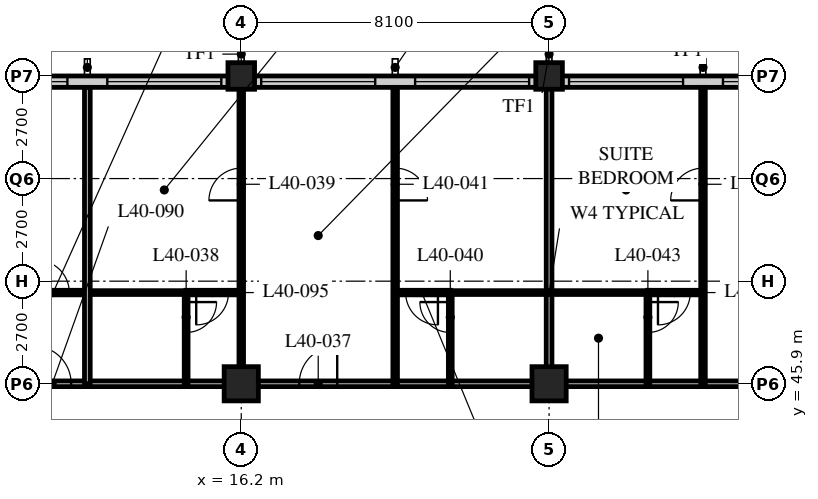
"""IFC4 building model, lengths in metres.
Left out: names, types, materials, properties, quantities, classifications, styles, units other than length and angle.
Written with IfcOpenShell. Run it as: python <this file> out.ifc"""

import sys

from ifc_helpers import new_model, si_unit, direction, frame, frame_2d, origin, origin_2d, place, context, subcontext, project, spatial, rectangle, hollow_rectangle, extrude, element, fill, save


model = new_model("IFC4")
c1 = context("Model", 3, precision=1e-05, world=origin(), true_north=direction((0.0, 1.0)))
c2 = subcontext(c1, "Body", "Model", "MODEL_VIEW")
j1 = project(units=[si_unit("LENGTHUNIT", "METRE"), si_unit("PLANEANGLEUNIT", "RADIAN")], contexts=[c1])
p1 = place(None, origin())
s1 = spatial("IfcSite", under=j1, at=p1, CompositionType="ELEMENT")
p2 = place(p1, origin())
s2 = spatial("IfcBuilding", under=s1, at=p2, CompositionType="ELEMENT")
p3 = place(p2, frame((0.0, 0.0, 154.4)))
s3 = spatial("IfcBuildingStorey", under=s2, at=p3, CompositionType="ELEMENT", Elevation=154.4)
p4 = place(p3, frame((16.2, 45.9, 0.0), z_axis=(0.0, 0.0, 1.0), x_axis=(1.0, 0.0, 0.0)))
e1 = element("IfcColumn", 1, at=p4, inside=s3, PredefinedType="COLUMN", context=c2, shape_type="SweptSolid", body=[
    extrude(hollow_rectangle(XDim=0.9, YDim=0.9, WallThickness=0.1, at=origin_2d()), origin(), (0.0, 0.0, 1.0), 3.4),
])
p5 = place(p3, frame((16.2, 54.0, 0.0), z_axis=(0.0, 0.0, 1.0), x_axis=(1.0, 0.0, 0.0)))
e2 = element("IfcColumn", 2, at=p5, inside=s3, PredefinedType="COLUMN", context=c2, shape_type="SweptSolid", body=[
    extrude(hollow_rectangle(XDim=0.7, YDim=0.7, WallThickness=0.07, at=origin_2d()), origin(), (0.0, 0.0, 1.0), 3.4),
])
p6 = place(p3, frame((24.3, 45.9, 0.0), z_axis=(0.0, 0.0, 1.0), x_axis=(1.0, 0.0, 0.0)))
e3 = element("IfcColumn", 3, at=p6, inside=s3, PredefinedType="COLUMN", context=c2, shape_type="SweptSolid", body=[
    extrude(hollow_rectangle(XDim=0.9, YDim=0.9, WallThickness=0.1, at=origin_2d()), origin(), (0.0, 0.0, 1.0), 3.4),
])
p7 = place(p3, frame((24.3, 54.0, 0.0), z_axis=(0.0, 0.0, 1.0), x_axis=(1.0, 0.0, 0.0)))
e4 = element("IfcColumn", 4, at=p7, inside=s3, PredefinedType="COLUMN", context=c2, shape_type="SweptSolid", body=[
    extrude(hollow_rectangle(XDim=0.7, YDim=0.7, WallThickness=0.07, at=origin_2d()), origin(), (0.0, 0.0, 1.0), 3.4),
])
p8 = place(p3, frame((48.3, 53.85, 0.0), z_axis=(0.0, 0.0, 1.0), x_axis=(-1.0, 0.0, 0.0)))
e5 = element("IfcWall", 5, at=p8, inside=s3, PredefinedType="SOLIDWALL", context=c2, shape_type="SweptSolid", body=[
    extrude(rectangle(XDim=40.2, YDim=0.3, at=frame_2d((20.1, 0.0))), origin(), (0.0, 0.0, 1.0), 2.15),
])
p9 = place(p8, frame((0.225, 0.0, 0.9)))
e6 = element("IfcOpeningElement", 6, at=p9, cuts=e5, PredefinedType="OPENING", context=c2, shape_type="SweptSolid", body=[
    extrude(rectangle(XDim=3.0, YDim=1.2, at=frame_2d((1.5, 0.6))), frame((0.0, 0.16, 0.0), z_axis=(0.0, -1.0, 0.0), x_axis=(1.0, 0.0, 0.0)), (0.0, 0.0, 1.0), 0.32),
])
p10 = place(p8, frame((4.275, 0.0, 0.9)))
e7 = element("IfcOpeningElement", 7, at=p10, cuts=e5, PredefinedType="OPENING", context=c2, shape_type="SweptSolid", body=[
    extrude(rectangle(XDim=3.0, YDim=1.2, at=frame_2d((1.5, 0.6))), frame((0.0, 0.16, 0.0), z_axis=(0.0, -1.0, 0.0), x_axis=(1.0, 0.0, 0.0)), (0.0, 0.0, 1.0), 0.32),
])
p11 = place(p8, frame((8.325, 0.0, 0.9)))
e8 = element("IfcOpeningElement", 8, at=p11, cuts=e5, PredefinedType="OPENING", context=c2, shape_type="SweptSolid", body=[
    extrude(rectangle(XDim=3.0, YDim=1.2, at=frame_2d((1.5, 0.6))), frame((0.0, 0.16, 0.0), z_axis=(0.0, -1.0, 0.0), x_axis=(1.0, 0.0, 0.0)), (0.0, 0.0, 1.0), 0.32),
])
p12 = place(p8, frame((12.375, 0.0, 0.9)))
e9 = element("IfcOpeningElement", 9, at=p12, cuts=e5, PredefinedType="OPENING", context=c2, shape_type="SweptSolid", body=[
    extrude(rectangle(XDim=3.0, YDim=1.2, at=frame_2d((1.5, 0.6))), frame((0.0, 0.16, 0.0), z_axis=(0.0, -1.0, 0.0), x_axis=(1.0, 0.0, 0.0)), (0.0, 0.0, 1.0), 0.32),
])
p13 = place(p8, frame((16.425, 0.0, 0.9)))
e10 = element("IfcOpeningElement", 10, at=p13, cuts=e5, PredefinedType="OPENING", context=c2, shape_type="SweptSolid", body=[
    extrude(rectangle(XDim=3.0, YDim=1.2, at=frame_2d((1.5, 0.6))), frame((0.0, 0.16, 0.0), z_axis=(0.0, -1.0, 0.0), x_axis=(1.0, 0.0, 0.0)), (0.0, 0.0, 1.0), 0.32),
])
p14 = place(p8, frame((20.475, 0.0, 0.9)))
e11 = element("IfcOpeningElement", 11, at=p14, cuts=e5, PredefinedType="OPENING", context=c2, shape_type="SweptSolid", body=[
    extrude(rectangle(XDim=3.0, YDim=1.2, at=frame_2d((1.5, 0.6))), frame((0.0, 0.16, 0.0), z_axis=(0.0, -1.0, 0.0), x_axis=(1.0, 0.0, 0.0)), (0.0, 0.0, 1.0), 0.32),
])
p15 = place(p8, frame((24.525, 0.0, 0.9)))
e12 = element("IfcOpeningElement", 12, at=p15, cuts=e5, PredefinedType="OPENING", context=c2, shape_type="SweptSolid", body=[
    extrude(rectangle(XDim=3.0, YDim=1.2, at=frame_2d((1.5, 0.6))), frame((0.0, 0.16, 0.0), z_axis=(0.0, -1.0, 0.0), x_axis=(1.0, 0.0, 0.0)), (0.0, 0.0, 1.0), 0.32),
])
p16 = place(p8, frame((28.575, 0.0, 0.9)))
e13 = element("IfcOpeningElement", 13, at=p16, cuts=e5, PredefinedType="OPENING", context=c2, shape_type="SweptSolid", body=[
    extrude(rectangle(XDim=3.0, YDim=1.2, at=frame_2d((1.5, 0.6))), frame((0.0, 0.16, 0.0), z_axis=(0.0, -1.0, 0.0), x_axis=(1.0, 0.0, 0.0)), (0.0, 0.0, 1.0), 0.32),
])
p17 = place(p8, frame((32.625, 0.0, 0.9)))
e14 = element("IfcOpeningElement", 14, at=p17, cuts=e5, PredefinedType="OPENING", context=c2, shape_type="SweptSolid", body=[
    extrude(rectangle(XDim=3.0, YDim=1.2, at=frame_2d((1.5, 0.6))), frame((0.0, 0.16, 0.0), z_axis=(0.0, -1.0, 0.0), x_axis=(1.0, 0.0, 0.0)), (0.0, 0.0, 1.0), 0.32),
])
p18 = place(p8, frame((36.675, 0.0, 0.9)))
e15 = element("IfcOpeningElement", 15, at=p18, cuts=e5, PredefinedType="OPENING", context=c2, shape_type="SweptSolid", body=[
    extrude(rectangle(XDim=3.0, YDim=1.2, at=frame_2d((1.5, 0.6))), frame((0.0, 0.16, 0.0), z_axis=(0.0, -1.0, 0.0), x_axis=(1.0, 0.0, 0.0)), (0.0, 0.0, 1.0), 0.32),
])
p19 = place(p3, frame((8.1, 45.9, 0.0), z_axis=(0.0, 0.0, 1.0), x_axis=(1.0, 0.0, 0.0)))
e16 = element("IfcWall", 16, at=p19, inside=s3, PredefinedType="PARTITIONING", context=c2, shape_type="SweptSolid", body=[
    extrude(rectangle(XDim=40.5, YDim=0.15, at=frame_2d((20.25, 0.0))), origin(), (0.0, 0.0, 1.0), 2.15),
])
p20 = place(p19, frame((9.625, 0.0, 0.0)))
e17 = element("IfcOpeningElement", 17, at=p20, cuts=e16, PredefinedType="OPENING", context=c2, shape_type="SweptSolid", body=[
    extrude(rectangle(XDim=1.0, YDim=2.1, at=frame_2d((0.5, 1.05))), frame((0.0, 0.085, 0.0), z_axis=(0.0, -1.0, 0.0), x_axis=(1.0, 0.0, 0.0)), (0.0, 0.0, 1.0), 0.17),
])
p21 = place(p19, frame((21.775, 0.0, 0.0)))
e18 = element("IfcOpeningElement", 18, at=p21, cuts=e16, PredefinedType="OPENING", context=c2, shape_type="SweptSolid", body=[
    extrude(rectangle(XDim=1.0, YDim=2.1, at=frame_2d((0.5, 1.05))), frame((0.0, 0.085, 0.0), z_axis=(0.0, -1.0, 0.0), x_axis=(1.0, 0.0, 0.0)), (0.0, 0.0, 1.0), 0.17),
])
p22 = place(p19, frame((28.95, 0.0, 0.0)))
e19 = element("IfcOpeningElement", 19, at=p22, cuts=e16, PredefinedType="OPENING", context=c2, shape_type="SweptSolid", body=[
    extrude(rectangle(XDim=1.0, YDim=2.1, at=frame_2d((0.5, 1.05))), frame((0.0, 0.085, 0.0), z_axis=(0.0, -1.0, 0.0), x_axis=(1.0, 0.0, 0.0)), (0.0, 0.0, 1.0), 0.17),
])
p23 = place(p19, frame((34.85, 0.0, 0.0)))
e20 = element("IfcOpeningElement", 20, at=p23, cuts=e16, PredefinedType="OPENING", context=c2, shape_type="SweptSolid", body=[
    extrude(rectangle(XDim=1.0, YDim=2.1, at=frame_2d((0.5, 1.05))), frame((0.0, 0.085, 0.0), z_axis=(0.0, -1.0, 0.0), x_axis=(1.0, 0.0, 0.0)), (0.0, 0.0, 1.0), 0.17),
])
p24 = place(p19, frame((36.875, 0.0, 0.0)))
e21 = element("IfcOpeningElement", 21, at=p24, cuts=e16, PredefinedType="OPENING", context=c2, shape_type="SweptSolid", body=[
    extrude(rectangle(XDim=1.0, YDim=2.1, at=frame_2d((0.5, 1.05))), frame((0.0, 0.085, 0.0), z_axis=(0.0, -1.0, 0.0), x_axis=(1.0, 0.0, 0.0)), (0.0, 0.0, 1.0), 0.17),
])
p25 = place(p19, frame((2.625, 0.0, 0.0)))
e22 = element("IfcOpeningElement", 22, at=p25, cuts=e16, PredefinedType="OPENING", context=c2, shape_type="SweptSolid", body=[
    extrude(rectangle(XDim=1.0, YDim=2.1, at=frame_2d((0.5, 1.05))), frame((0.0, 0.085, 0.0), z_axis=(0.0, -1.0, 0.0), x_axis=(1.0, 0.0, 0.0)), (0.0, 0.0, 1.0), 0.17),
])
p26 = place(p3, frame((12.15, 48.3, 0.0), z_axis=(0.0, 0.0, 1.0), x_axis=(1.0, 0.0, 0.0)))
e23 = element("IfcWall", 23, at=p26, inside=s3, PredefinedType="PARTITIONING", context=c2, shape_type="SweptSolid", body=[
    extrude(rectangle(XDim=2.6, YDim=0.1, at=frame_2d((1.3, 0.0))), origin(), (0.0, 0.0, 1.0), 3.15),
])
p27 = place(p3, frame((14.75, 45.9, 0.0), z_axis=(0.0, 0.0, 1.0), x_axis=(0.0, 1.0, 0.0)))
e24 = element("IfcWall", 24, at=p27, inside=s3, PredefinedType="PARTITIONING", context=c2, shape_type="SweptSolid", body=[
    extrude(rectangle(XDim=2.4, YDim=0.1, at=frame_2d((1.2, 0.0))), origin(), (0.0, 0.0, 1.0), 3.15),
])
p28 = place(p27, frame((1.35, 0.0, 0.0)))
e25 = element("IfcOpeningElement", 25, at=p28, cuts=e24, PredefinedType="OPENING", context=c2, shape_type="SweptSolid", body=[
    extrude(rectangle(XDim=0.8, YDim=2.1, at=frame_2d((0.4, 1.05))), frame((0.0, 0.06, 0.0), z_axis=(0.0, -1.0, 0.0), x_axis=(1.0, 0.0, 0.0)), (0.0, 0.0, 1.0), 0.12),
])
p29 = place(p3, frame((16.2, 45.9, 0.0), z_axis=(0.0, 0.0, 1.0), x_axis=(0.0, 1.0, 0.0)))
e26 = element("IfcWall", 26, at=p29, inside=s3, PredefinedType="PARTITIONING", context=c2, shape_type="SweptSolid", body=[
    extrude(rectangle(XDim=7.8, YDim=0.12, at=frame_2d((3.9, 0.0))), origin(), (0.0, 0.0, 1.0), 2.15),
])
p30 = place(p29, frame((4.825, 0.0, 0.0)))
e27 = element("IfcOpeningElement", 27, at=p30, cuts=e26, PredefinedType="OPENING", context=c2, shape_type="SweptSolid", body=[
    extrude(rectangle(XDim=0.85, YDim=2.1, at=frame_2d((0.425, 1.05))), frame((0.0, 0.07, 0.0), z_axis=(0.0, -1.0, 0.0), x_axis=(1.0, 0.0, 0.0)), (0.0, 0.0, 1.0), 0.14),
])
p31 = place(p3, frame((21.7, 48.3, 0.0), z_axis=(0.0, 0.0, 1.0), x_axis=(1.0, 0.0, 0.0)))
e28 = element("IfcWall", 28, at=p31, inside=s3, PredefinedType="PARTITIONING", context=c2, shape_type="SweptSolid", body=[
    extrude(rectangle(XDim=5.2, YDim=0.1, at=frame_2d((2.6, 0.0))), origin(), (0.0, 0.0, 1.0), 3.15),
])
p32 = place(p3, frame((21.7, 45.9, 0.0), z_axis=(0.0, 0.0, 1.0), x_axis=(0.0, 1.0, 0.0)))
e29 = element("IfcWall", 29, at=p32, inside=s3, PredefinedType="PARTITIONING", context=c2, shape_type="SweptSolid", body=[
    extrude(rectangle(XDim=2.4, YDim=0.1, at=frame_2d((1.2, 0.0))), origin(), (0.0, 0.0, 1.0), 3.15),
])
p33 = place(p32, frame((1.35, 0.0, 0.0)))
e30 = element("IfcOpeningElement", 30, at=p33, cuts=e29, PredefinedType="OPENING", context=c2, shape_type="SweptSolid", body=[
    extrude(rectangle(XDim=0.8, YDim=2.1, at=frame_2d((0.4, 1.05))), frame((0.0, 0.06, 0.0), z_axis=(0.0, -1.0, 0.0), x_axis=(1.0, 0.0, 0.0)), (0.0, 0.0, 1.0), 0.12),
])
p34 = place(p3, frame((20.25, 45.9, 0.0), z_axis=(0.0, 0.0, 1.0), x_axis=(0.0, 1.0, 0.0)))
e31 = element("IfcWall", 31, at=p34, inside=s3, PredefinedType="PARTITIONING", context=c2, shape_type="SweptSolid", body=[
    extrude(rectangle(XDim=7.8, YDim=0.12, at=frame_2d((3.9, 0.0))), origin(), (0.0, 0.0, 1.0), 3.15),
])
p35 = place(p34, frame((4.825, 0.0, 0.0)))
e32 = element("IfcOpeningElement", 32, at=p35, cuts=e31, PredefinedType="OPENING", context=c2, shape_type="SweptSolid", body=[
    extrude(rectangle(XDim=0.85, YDim=2.1, at=frame_2d((0.425, 1.05))), frame((0.0, 0.07, 0.0), z_axis=(0.0, -1.0, 0.0), x_axis=(1.0, 0.0, 0.0)), (0.0, 0.0, 1.0), 0.14),
])
p36 = place(p3, frame((24.3, 45.9, 0.0), z_axis=(0.0, 0.0, 1.0), x_axis=(0.0, 1.0, 0.0)))
e33 = element("IfcWall", 33, at=p36, inside=s3, PredefinedType="PARTITIONING", context=c2, shape_type="SweptSolid", body=[
    extrude(rectangle(XDim=7.8, YDim=0.15, at=frame_2d((3.9, 0.0))), origin(), (0.0, 0.0, 1.0), 2.15),
])
p37 = place(p3, frame((26.9, 45.9, 0.0), z_axis=(0.0, 0.0, 1.0), x_axis=(0.0, 1.0, 0.0)))
e34 = element("IfcWall", 34, at=p37, inside=s3, PredefinedType="PARTITIONING", context=c2, shape_type="SweptSolid", body=[
    extrude(rectangle(XDim=2.4, YDim=0.1, at=frame_2d((1.2, 0.0))), origin(), (0.0, 0.0, 1.0), 3.15),
])
p38 = place(p37, frame((1.35, 0.0, 0.0)))
e35 = element("IfcOpeningElement", 35, at=p38, cuts=e34, PredefinedType="OPENING", context=c2, shape_type="SweptSolid", body=[
    extrude(rectangle(XDim=0.8, YDim=2.1, at=frame_2d((0.4, 1.05))), frame((0.0, 0.06, 0.0), z_axis=(0.0, -1.0, 0.0), x_axis=(1.0, 0.0, 0.0)), (0.0, 0.0, 1.0), 0.12),
])
p39 = place(p3, frame((28.35, 45.9, 0.0), z_axis=(0.0, 0.0, 1.0), x_axis=(0.0, 1.0, 0.0)))
e36 = element("IfcWall", 36, at=p39, inside=s3, PredefinedType="PARTITIONING", context=c2, shape_type="SweptSolid", body=[
    extrude(rectangle(XDim=7.8, YDim=0.12, at=frame_2d((3.9, 0.0))), origin(), (0.0, 0.0, 1.0), 3.15),
])
p40 = place(p39, frame((4.825, 0.0, 0.0)))
e37 = element("IfcOpeningElement", 37, at=p40, cuts=e36, PredefinedType="OPENING", context=c2, shape_type="SweptSolid", body=[
    extrude(rectangle(XDim=0.85, YDim=2.1, at=frame_2d((0.425, 1.05))), frame((0.0, 0.07, 0.0), z_axis=(0.0, -1.0, 0.0), x_axis=(1.0, 0.0, 0.0)), (0.0, 0.0, 1.0), 0.14),
])
p41 = place(p3, frame((8.1, 48.3, 0.0), z_axis=(0.0, 0.0, 1.0), x_axis=(1.0, 0.0, 0.0)))
e38 = element("IfcWall", 38, at=p41, inside=s3, PredefinedType="PARTITIONING", context=c2, shape_type="SweptSolid", body=[
    extrude(rectangle(XDim=4.05, YDim=0.12, at=frame_2d((2.025, 0.0))), origin(), (0.0, 0.0, 1.0), 3.15),
])
p42 = place(p41, frame((2.725, 0.0, 0.0)))
e39 = element("IfcOpeningElement", 39, at=p42, cuts=e38, PredefinedType="OPENING", context=c2, shape_type="SweptSolid", body=[
    extrude(rectangle(XDim=0.85, YDim=2.1, at=frame_2d((0.425, 1.05))), frame((0.0, 0.07, 0.0), z_axis=(0.0, -1.0, 0.0), x_axis=(1.0, 0.0, 0.0)), (0.0, 0.0, 1.0), 0.14),
])
p43 = place(p3, frame((12.15, 45.9, 0.0), z_axis=(0.0, 0.0, 1.0), x_axis=(0.0, 1.0, 0.0)))
e40 = element("IfcWall", 40, at=p43, inside=s3, PredefinedType="PARTITIONING", context=c2, shape_type="SweptSolid", body=[
    extrude(rectangle(XDim=7.8, YDim=0.15, at=frame_2d((3.9, 0.0))), origin(), (0.0, 0.0, 1.0), 3.15),
])
p44 = place(p3, frame((14.74, 48.3, 0.0), z_axis=(0.0, 0.0, 1.0), x_axis=(1.0, 0.0, 0.0)))
e41 = element("IfcWall", 41, at=p44, inside=s3, PredefinedType="PARTITIONING", context=c2, shape_type="SweptSolid", body=[
    extrude(rectangle(XDim=1.46, YDim=0.12, at=frame_2d((0.73, 0.0))), origin(), (0.0, 0.0, 1.0), 3.15),
])
p45 = place(p44, frame((0.275, 0.0, 0.0)))
e42 = element("IfcOpeningElement", 42, at=p45, cuts=e41, PredefinedType="OPENING", context=c2, shape_type="SweptSolid", body=[
    extrude(rectangle(XDim=0.85, YDim=2.1, at=frame_2d((0.425, 1.05))), frame((0.0, 0.07, 0.0), z_axis=(0.0, -1.0, 0.0), x_axis=(1.0, 0.0, 0.0)), (0.0, 0.0, 1.0), 0.14),
])
p46 = place(p3, frame((20.25, 48.3, 0.0), z_axis=(0.0, 0.0, 1.0), x_axis=(1.0, 0.0, 0.0)))
e43 = element("IfcWall", 43, at=p46, inside=s3, PredefinedType="PARTITIONING", context=c2, shape_type="SweptSolid", body=[
    extrude(rectangle(XDim=1.46, YDim=0.12, at=frame_2d((0.73, 0.0))), origin(), (0.0, 0.0, 1.0), 3.15),
])
p47 = place(p46, frame((0.275, 0.0, 0.0)))
e44 = element("IfcOpeningElement", 44, at=p47, cuts=e43, PredefinedType="OPENING", context=c2, shape_type="SweptSolid", body=[
    extrude(rectangle(XDim=0.85, YDim=2.1, at=frame_2d((0.425, 1.05))), frame((0.0, 0.07, 0.0), z_axis=(0.0, -1.0, 0.0), x_axis=(1.0, 0.0, 0.0)), (0.0, 0.0, 1.0), 0.14),
])
p48 = place(p3, frame((26.89, 48.3, 0.0), z_axis=(0.0, 0.0, 1.0), x_axis=(1.0, 0.0, 0.0)))
e45 = element("IfcWall", 45, at=p48, inside=s3, PredefinedType="PARTITIONING", context=c2, shape_type="SweptSolid", body=[
    extrude(rectangle(XDim=1.46, YDim=0.12, at=frame_2d((0.73, 0.0))), origin(), (0.0, 0.0, 1.0), 3.15),
])
p49 = place(p48, frame((0.275, 0.0, 0.0)))
e46 = element("IfcOpeningElement", 46, at=p49, cuts=e45, PredefinedType="OPENING", context=c2, shape_type="SweptSolid", body=[
    extrude(rectangle(XDim=0.85, YDim=2.1, at=frame_2d((0.425, 1.05))), frame((0.0, 0.07, 0.0), z_axis=(0.0, -1.0, 0.0), x_axis=(1.0, 0.0, 0.0)), (0.0, 0.0, 1.0), 0.14),
])
p50 = place(p13, origin())
e47 = element("IfcWindow", 47, at=p50, inside=s3, PartitioningType="SINGLE_PANEL", PredefinedType="WINDOW", context=c2, shape_type="SweptSolid", body=[
    extrude(rectangle(XDim=3.0, YDim=1.2, at=frame_2d((1.5, 0.6))), frame((0.0, 0.03, 0.0), z_axis=(0.0, -1.0, 0.0), x_axis=(1.0, 0.0, 0.0)), (0.0, 0.0, 1.0), 0.06),
])
fill(e10, e47)
p51 = place(p14, origin())
e48 = element("IfcWindow", 48, at=p51, inside=s3, PartitioningType="SINGLE_PANEL", PredefinedType="WINDOW", context=c2, shape_type="SweptSolid", body=[
    extrude(rectangle(XDim=3.0, YDim=1.2, at=frame_2d((1.5, 0.6))), frame((0.0, 0.03, 0.0), z_axis=(0.0, -1.0, 0.0), x_axis=(1.0, 0.0, 0.0)), (0.0, 0.0, 1.0), 0.06),
])
fill(e11, e48)
p52 = place(p15, origin())
e49 = element("IfcWindow", 49, at=p52, inside=s3, PartitioningType="SINGLE_PANEL", PredefinedType="WINDOW", context=c2, shape_type="SweptSolid", body=[
    extrude(rectangle(XDim=3.0, YDim=1.2, at=frame_2d((1.5, 0.6))), frame((0.0, 0.03, 0.0), z_axis=(0.0, -1.0, 0.0), x_axis=(1.0, 0.0, 0.0)), (0.0, 0.0, 1.0), 0.06),
])
fill(e12, e49)
p53 = place(p16, origin())
e50 = element("IfcWindow", 50, at=p53, inside=s3, PartitioningType="SINGLE_PANEL", PredefinedType="WINDOW", context=c2, shape_type="SweptSolid", body=[
    extrude(rectangle(XDim=3.0, YDim=1.2, at=frame_2d((1.5, 0.6))), frame((0.0, 0.03, 0.0), z_axis=(0.0, -1.0, 0.0), x_axis=(1.0, 0.0, 0.0)), (0.0, 0.0, 1.0), 0.06),
])
fill(e13, e50)
p54 = place(p17, origin())
e51 = element("IfcWindow", 51, at=p54, inside=s3, PartitioningType="SINGLE_PANEL", PredefinedType="WINDOW", context=c2, shape_type="SweptSolid", body=[
    extrude(rectangle(XDim=3.0, YDim=1.2, at=frame_2d((1.5, 0.6))), frame((0.0, 0.03, 0.0), z_axis=(0.0, -1.0, 0.0), x_axis=(1.0, 0.0, 0.0)), (0.0, 0.0, 1.0), 0.06),
])
fill(e14, e51)
p55 = place(p18, origin())
e52 = element("IfcWindow", 52, at=p55, inside=s3, PartitioningType="SINGLE_PANEL", PredefinedType="WINDOW", context=c2, shape_type="SweptSolid", body=[
    extrude(rectangle(XDim=3.0, YDim=1.2, at=frame_2d((1.5, 0.6))), frame((0.0, 0.03, 0.0), z_axis=(0.0, -1.0, 0.0), x_axis=(1.0, 0.0, 0.0)), (0.0, 0.0, 1.0), 0.06),
])
fill(e15, e52)
p56 = place(p20, origin())
e53 = element("IfcDoor", 53, at=p56, inside=s3, OperationType="SINGLE_SWING_RIGHT", PredefinedType="DOOR", context=c2, shape_type="SweptSolid", body=[
    extrude(rectangle(XDim=1.0, YDim=2.1, at=frame_2d((0.5, 1.05))), frame((0.0, 0.025, 0.0), z_axis=(0.0, -1.0, 0.0), x_axis=(1.0, 0.0, 0.0)), (0.0, 0.0, 1.0), 0.05),
])
fill(e17, e53)
p57 = place(p28, origin())
e54 = element("IfcDoor", 54, at=p57, inside=s3, OperationType="SINGLE_SWING_LEFT", PredefinedType="DOOR", context=c2, shape_type="SweptSolid", body=[
    extrude(rectangle(XDim=0.8, YDim=2.1, at=frame_2d((0.4, 1.05))), frame((0.0, 0.025, 0.0), z_axis=(0.0, -1.0, 0.0), x_axis=(1.0, 0.0, 0.0)), (0.0, 0.0, 1.0), 0.05),
])
fill(e25, e54)
p58 = place(p30, origin())
e55 = element("IfcDoor", 55, at=p58, inside=s3, OperationType="SINGLE_SWING_LEFT", PredefinedType="DOOR", context=c2, shape_type="SweptSolid", body=[
    extrude(rectangle(XDim=0.85, YDim=2.1, at=frame_2d((0.425, 1.05))), frame((0.0, 0.025, 0.0), z_axis=(0.0, -1.0, 0.0), x_axis=(1.0, 0.0, 0.0)), (0.0, 0.0, 1.0), 0.05),
])
fill(e27, e55)
p59 = place(p33, origin())
e56 = element("IfcDoor", 56, at=p59, inside=s3, OperationType="SINGLE_SWING_RIGHT", PredefinedType="DOOR", context=c2, shape_type="SweptSolid", body=[
    extrude(rectangle(XDim=0.8, YDim=2.1, at=frame_2d((0.4, 1.05))), frame((0.0, 0.025, 0.0), z_axis=(0.0, -1.0, 0.0), x_axis=(1.0, 0.0, 0.0)), (0.0, 0.0, 1.0), 0.05),
])
fill(e30, e56)
p60 = place(p35, origin())
e57 = element("IfcDoor", 57, at=p60, inside=s3, OperationType="SINGLE_SWING_RIGHT", PredefinedType="DOOR", context=c2, shape_type="SweptSolid", body=[
    extrude(rectangle(XDim=0.85, YDim=2.1, at=frame_2d((0.425, 1.05))), frame((0.0, 0.025, 0.0), z_axis=(0.0, -1.0, 0.0), x_axis=(1.0, 0.0, 0.0)), (0.0, 0.0, 1.0), 0.05),
])
fill(e32, e57)
p61 = place(p38, origin())
e58 = element("IfcDoor", 58, at=p61, inside=s3, OperationType="SINGLE_SWING_LEFT", PredefinedType="DOOR", context=c2, shape_type="SweptSolid", body=[
    extrude(rectangle(XDim=0.8, YDim=2.1, at=frame_2d((0.4, 1.05))), frame((0.0, 0.025, 0.0), z_axis=(0.0, -1.0, 0.0), x_axis=(1.0, 0.0, 0.0)), (0.0, 0.0, 1.0), 0.05),
])
fill(e35, e58)
p62 = place(p40, origin())
e59 = element("IfcDoor", 59, at=p62, inside=s3, OperationType="SINGLE_SWING_LEFT", PredefinedType="DOOR", context=c2, shape_type="SweptSolid", body=[
    extrude(rectangle(XDim=0.85, YDim=2.1, at=frame_2d((0.425, 1.05))), frame((0.0, 0.025, 0.0), z_axis=(0.0, -1.0, 0.0), x_axis=(1.0, 0.0, 0.0)), (0.0, 0.0, 1.0), 0.05),
])
fill(e37, e59)
p63 = place(p25, origin())
e60 = element("IfcDoor", 60, at=p63, inside=s3, OperationType="SINGLE_SWING_LEFT", PredefinedType="DOOR", context=c2, shape_type="SweptSolid", body=[
    extrude(rectangle(XDim=1.0, YDim=2.1, at=frame_2d((0.5, 1.05))), frame((0.0, 0.025, 0.0), z_axis=(0.0, -1.0, 0.0), x_axis=(1.0, 0.0, 0.0)), (0.0, 0.0, 1.0), 0.05),
])
fill(e22, e60)
p64 = place(p42, origin())
e61 = element("IfcDoor", 61, at=p64, inside=s3, OperationType="SINGLE_SWING_LEFT", PredefinedType="DOOR", context=c2, shape_type="SweptSolid", body=[
    extrude(rectangle(XDim=0.85, YDim=2.1, at=frame_2d((0.425, 1.05))), frame((0.0, 0.025, 0.0), z_axis=(0.0, -1.0, 0.0), x_axis=(1.0, 0.0, 0.0)), (0.0, 0.0, 1.0), 0.05),
])
fill(e39, e61)
p65 = place(p45, origin())
e62 = element("IfcDoor", 62, at=p65, inside=s3, OperationType="SINGLE_SWING_RIGHT", PredefinedType="DOOR", context=c2, shape_type="SweptSolid", body=[
    extrude(rectangle(XDim=0.85, YDim=2.1, at=frame_2d((0.425, 1.05))), frame((0.0, 0.025, 0.0), z_axis=(0.0, -1.0, 0.0), x_axis=(1.0, 0.0, 0.0)), (0.0, 0.0, 1.0), 0.05),
])
fill(e42, e62)
p66 = place(p47, origin())
e63 = element("IfcDoor", 63, at=p66, inside=s3, OperationType="SINGLE_SWING_LEFT", PredefinedType="DOOR", context=c2, shape_type="SweptSolid", body=[
    extrude(rectangle(XDim=0.85, YDim=2.1, at=frame_2d((0.425, 1.05))), frame((0.0, 0.025, 0.0), z_axis=(0.0, -1.0, 0.0), x_axis=(1.0, 0.0, 0.0)), (0.0, 0.0, 1.0), 0.05),
])
fill(e44, e63)
p67 = place(p49, origin())
e64 = element("IfcDoor", 64, at=p67, inside=s3, OperationType="SINGLE_SWING_RIGHT", PredefinedType="DOOR", context=c2, shape_type="SweptSolid", body=[
    extrude(rectangle(XDim=0.85, YDim=2.1, at=frame_2d((0.425, 1.05))), frame((0.0, 0.025, 0.0), z_axis=(0.0, -1.0, 0.0), x_axis=(1.0, 0.0, 0.0)), (0.0, 0.0, 1.0), 0.05),
])
fill(e46, e64)
save(model, sys.argv[1])
